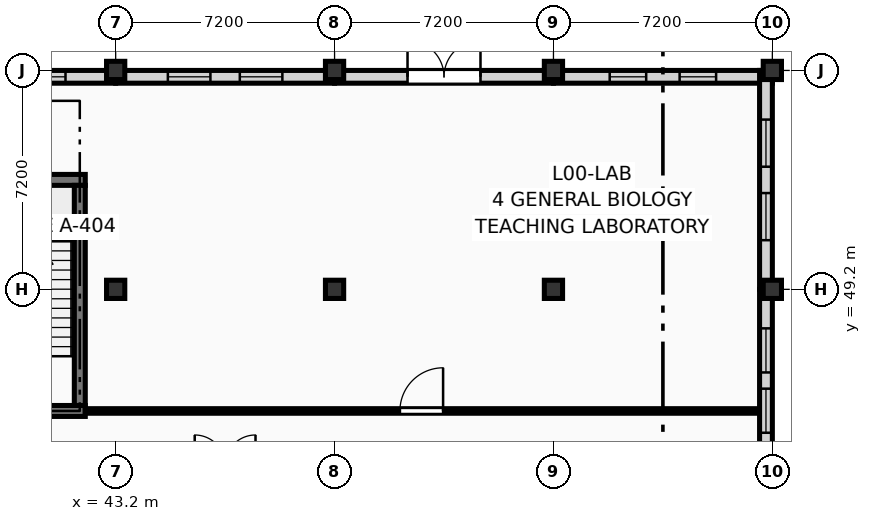
"""IFC4 building model, lengths in metres.
Left out: names, types, materials, properties, quantities, classifications, styles, units other than length and angle.
Written with IfcOpenShell. Run it as: python <this file> out.ifc"""

import sys

from ifc_helpers import new_model, si_unit, direction, frame, frame_2d, origin, origin_2d, place, context, subcontext, project, spatial, rectangle, extrude, element, fill, save


model = new_model("IFC4")
c1 = context("Model", 3, precision=1e-05, world=origin(), true_north=direction((0.0, 1.0)))
c2 = subcontext(c1, "Body", "Model", "MODEL_VIEW")
j1 = project(units=[si_unit("LENGTHUNIT", "METRE"), si_unit("PLANEANGLEUNIT", "RADIAN")], contexts=[c1])
p1 = place(None, origin())
s1 = spatial("IfcSite", under=j1, at=p1, CompositionType="ELEMENT")
p2 = place(p1, origin())
s2 = spatial("IfcBuilding", under=s1, at=p2, CompositionType="ELEMENT")
p3 = place(p2, origin())
s3 = spatial("IfcBuildingStorey", under=s2, at=p3, CompositionType="ELEMENT", Elevation=0.0)
for number, where, z_axis, x_axis in (
    (1, (43.2, 49.2, 0.0), (0.0, 0.0, 1.0), (1.0, 0.0, 0.0)),
    (2, (43.2, 56.4, 0.0), (0.0, 0.0, 1.0), (1.0, 0.0, 0.0)),
    (3, (50.4, 49.2, 0.0), (0.0, 0.0, 1.0), (1.0, 0.0, 0.0)),
    (4, (50.4, 56.4, 0.0), (0.0, 0.0, 1.0), (1.0, 0.0, 0.0)),
    (5, (57.6, 49.2, 0.0), (0.0, 0.0, 1.0), (1.0, 0.0, 0.0)),
    (6, (57.6, 56.4, 0.0), (0.0, 0.0, 1.0), (1.0, 0.0, 0.0)),
    (7, (64.8, 49.2, 0.0), (0.0, 0.0, 1.0), (1.0, 0.0, 0.0)),
    (8, (64.8, 56.4, 0.0), (0.0, 0.0, 1.0), (1.0, 0.0, 0.0)),
):
    element("IfcColumn", number, at=place(p3, frame(where, z_axis=z_axis, x_axis=x_axis)), inside=s3, PredefinedType="COLUMN", context=c2, shape_type="SweptSolid", body=[
        extrude(rectangle(XDim=0.6, YDim=0.6, at=origin_2d()), origin(), (0.0, 0.0, 1.0), 4.5),
    ])
p4 = place(p3, frame((36.0, 56.19, 0.0), z_axis=(0.0, 0.0, 1.0), x_axis=(1.0, 0.0, 0.0)))
e9 = element("IfcWall", 9, at=p4, inside=s3, PredefinedType="SOLIDWALL", context=c2, shape_type="SweptSolid", body=[
    extrude(rectangle(XDim=7.2, YDim=0.42, at=frame_2d((3.6, 0.0))), origin(), (0.0, 0.0, 1.0), 3.62),
])
p5 = place(p4, frame((1.65, 0.0, 0.45)))
e10 = element("IfcOpeningElement", 10, at=p5, cuts=e9, PredefinedType="OPENING", context=c2, shape_type="SweptSolid", body=[
    extrude(rectangle(XDim=1.5, YDim=2.4, at=frame_2d((0.75, 1.2))), frame((0.0, 0.222, 0.0), z_axis=(0.0, -1.0, 0.0), x_axis=(1.0, 0.0, 0.0)), (0.0, 0.0, 1.0), 0.444),
])
p6 = place(p4, frame((4.05, 0.0, 0.45)))
e11 = element("IfcOpeningElement", 11, at=p6, cuts=e9, PredefinedType="OPENING", context=c2, shape_type="SweptSolid", body=[
    extrude(rectangle(XDim=1.5, YDim=2.4, at=frame_2d((0.75, 1.2))), frame((0.0, 0.222, 0.0), z_axis=(0.0, -1.0, 0.0), x_axis=(1.0, 0.0, 0.0)), (0.0, 0.0, 1.0), 0.444),
])
p7 = place(p3, frame((43.2, 56.19, 0.0), z_axis=(0.0, 0.0, 1.0), x_axis=(1.0, 0.0, 0.0)))
e12 = element("IfcWall", 12, at=p7, inside=s3, PredefinedType="SOLIDWALL", context=c2, shape_type="SweptSolid", body=[
    extrude(rectangle(XDim=7.2, YDim=0.42, at=frame_2d((3.6, 0.0))), origin(), (0.0, 0.0, 1.0), 3.62),
])
p8 = place(p7, frame((1.717, 0.0, 0.45)))
e13 = element("IfcOpeningElement", 13, at=p8, cuts=e12, PredefinedType="OPENING", context=c2, shape_type="SweptSolid", body=[
    extrude(rectangle(XDim=1.4, YDim=2.38, at=frame_2d((0.7, 1.19))), frame((0.0, 0.222, 0.0), z_axis=(0.0, -1.0, 0.0), x_axis=(1.0, 0.0, 0.0)), (0.0, 0.0, 1.0), 0.444),
])
p9 = place(p7, frame((4.083, 0.0, 0.45)))
e14 = element("IfcOpeningElement", 14, at=p9, cuts=e12, PredefinedType="OPENING", context=c2, shape_type="SweptSolid", body=[
    extrude(rectangle(XDim=1.4, YDim=2.38, at=frame_2d((0.7, 1.19))), frame((0.0, 0.222, 0.0), z_axis=(0.0, -1.0, 0.0), x_axis=(1.0, 0.0, 0.0)), (0.0, 0.0, 1.0), 0.444),
])
p10 = place(p3, frame((50.4, 56.19, 0.0), z_axis=(0.0, 0.0, 1.0), x_axis=(1.0, 0.0, 0.0)))
e15 = element("IfcWall", 15, at=p10, inside=s3, PredefinedType="SOLIDWALL", context=c2, shape_type="SweptSolid", body=[
    extrude(rectangle(XDim=7.2, YDim=0.42, at=frame_2d((3.6, 0.0))), origin(), (0.0, 0.0, 1.0), 3.62),
])
p11 = place(p10, frame((2.4, 0.0, 0.0)))
e16 = element("IfcOpeningElement", 16, at=p11, cuts=e15, PredefinedType="OPENING", context=c2, shape_type="SweptSolid", body=[
    extrude(rectangle(XDim=2.4, YDim=2.6, at=frame_2d((1.2, 1.3))), frame((0.0, 0.222, 0.0), z_axis=(0.0, -1.0, 0.0), x_axis=(1.0, 0.0, 0.0)), (0.0, 0.0, 1.0), 0.444),
])
p12 = place(p3, frame((57.6, 56.19, 0.0), z_axis=(0.0, 0.0, 1.0), x_axis=(1.0, 0.0, 0.0)))
e17 = element("IfcWall", 17, at=p12, inside=s3, PredefinedType="SOLIDWALL", context=c2, shape_type="SweptSolid", body=[
    extrude(rectangle(XDim=7.2, YDim=0.42, at=frame_2d((3.6, 0.0))), origin(), (0.0, 0.0, 1.0), 3.62),
])
p13 = place(p12, frame((1.85, 0.0, 0.45)))
e18 = element("IfcOpeningElement", 18, at=p13, cuts=e17, PredefinedType="OPENING", context=c2, shape_type="SweptSolid", body=[
    extrude(rectangle(XDim=1.2, YDim=2.35, at=frame_2d((0.6, 1.175))), frame((0.0, 0.222, 0.0), z_axis=(0.0, -1.0, 0.0), x_axis=(1.0, 0.0, 0.0)), (0.0, 0.0, 1.0), 0.444),
])
p14 = place(p12, frame((4.15, 0.0, 0.45)))
e19 = element("IfcOpeningElement", 19, at=p14, cuts=e17, PredefinedType="OPENING", context=c2, shape_type="SweptSolid", body=[
    extrude(rectangle(XDim=1.2, YDim=2.35, at=frame_2d((0.6, 1.175))), frame((0.0, 0.222, 0.0), z_axis=(0.0, -1.0, 0.0), x_axis=(1.0, 0.0, 0.0)), (0.0, 0.0, 1.0), 0.444),
])
p15 = place(p3, frame((64.59, 49.2, 0.0), z_axis=(0.0, 0.0, 1.0), x_axis=(0.0, 1.0, 0.0)))
e20 = element("IfcWall", 20, at=p15, inside=s3, PredefinedType="SOLIDWALL", context=c2, shape_type="SweptSolid", body=[
    extrude(rectangle(XDim=7.2, YDim=0.42, at=frame_2d((3.6, 0.0))), origin(), (0.0, 0.0, 1.0), 3.62),
])
p16 = place(p15, frame((1.617, 0.0, 0.45)))
e21 = element("IfcOpeningElement", 21, at=p16, cuts=e20, PredefinedType="OPENING", context=c2, shape_type="SweptSolid", body=[
    extrude(rectangle(XDim=1.55, YDim=2.85, at=frame_2d((0.775, 1.425))), frame((0.0, 0.222, 0.0), z_axis=(0.0, -1.0, 0.0), x_axis=(1.0, 0.0, 0.0)), (0.0, 0.0, 1.0), 0.444),
])
p17 = place(p15, frame((4.033, 0.0, 0.45)))
e22 = element("IfcOpeningElement", 22, at=p17, cuts=e20, PredefinedType="OPENING", context=c2, shape_type="SweptSolid", body=[
    extrude(rectangle(XDim=1.55, YDim=2.85, at=frame_2d((0.775, 1.425))), frame((0.0, 0.222, 0.0), z_axis=(0.0, -1.0, 0.0), x_axis=(1.0, 0.0, 0.0)), (0.0, 0.0, 1.0), 0.444),
])
p18 = place(p3, frame((64.59, 43.2, 0.0), z_axis=(0.0, 0.0, 1.0), x_axis=(0.0, 1.0, 0.0)))
e23 = element("IfcWall", 23, at=p18, inside=s3, PredefinedType="SOLIDWALL", context=c2, shape_type="SweptSolid", body=[
    extrude(rectangle(XDim=6.0, YDim=0.42, at=frame_2d((3.0, 0.0))), origin(), (0.0, 0.0, 1.0), 3.62),
])
p19 = place(p18, frame((1.283, 0.0, 0.45)))
e24 = element("IfcOpeningElement", 24, at=p19, cuts=e23, PredefinedType="OPENING", context=c2, shape_type="SweptSolid", body=[
    extrude(rectangle(XDim=1.45, YDim=2.8, at=frame_2d((0.725, 1.4))), frame((0.0, 0.222, 0.0), z_axis=(0.0, -1.0, 0.0), x_axis=(1.0, 0.0, 0.0)), (0.0, 0.0, 1.0), 0.444),
])
p20 = place(p18, frame((3.267, 0.0, 0.45)))
e25 = element("IfcOpeningElement", 25, at=p20, cuts=e23, PredefinedType="OPENING", context=c2, shape_type="SweptSolid", body=[
    extrude(rectangle(XDim=1.45, YDim=2.8, at=frame_2d((0.725, 1.4))), frame((0.0, 0.222, 0.0), z_axis=(0.0, -1.0, 0.0), x_axis=(1.0, 0.0, 0.0)), (0.0, 0.0, 1.0), 0.444),
])
for number, where, z_axis, x_axis in (
    (26, (37.72, 45.2, 0.0), (0.0, 0.0, 1.0), (1.0, 0.0, 0.0)),
    (27, (37.72, 52.8, 0.0), (0.0, 0.0, 1.0), (1.0, 0.0, 0.0)),
):
    element("IfcWall", number, at=place(p3, frame(where, z_axis=z_axis, x_axis=x_axis)), inside=s3, PredefinedType="SHEAR", context=c2, shape_type="SweptSolid", body=[
        extrude(rectangle(XDim=4.48, YDim=0.36, at=frame_2d((2.24, 0.0))), origin(), (0.0, 0.0, 1.0), 4.25),
    ])
p21 = place(p3, frame((42.02, 45.38, 0.0), z_axis=(0.0, 0.0, 1.0), x_axis=(0.0, 1.0, 0.0)))
e28 = element("IfcWall", 28, at=p21, inside=s3, PredefinedType="SHEAR", context=c2, shape_type="SweptSolid", body=[
    extrude(rectangle(XDim=7.24, YDim=0.36, at=frame_2d((3.62, 0.0))), origin(), (0.0, 0.0, 1.0), 4.25),
])
p22 = place(p3, frame((42.2, 45.2, 0.0), z_axis=(0.0, 0.0, 1.0), x_axis=(1.0, 0.0, 0.0)))
e29 = element("IfcWall", 29, at=p22, inside=s3, PredefinedType="PARTITIONING", context=c2, shape_type="SweptSolid", body=[
    extrude(rectangle(XDim=22.12, YDim=0.15, at=frame_2d((11.06, 0.0))), origin(), (0.0, 0.0, 1.0), 4.235),
])
p23 = place(p22, frame((10.35, 0.0, 0.0)))
e30 = element("IfcOpeningElement", 30, at=p23, cuts=e29, PredefinedType="OPENING", context=c2, shape_type="SweptSolid", body=[
    extrude(rectangle(XDim=1.42, YDim=2.22, at=frame_2d((0.71, 1.11))), frame((0.0, 0.087, 0.0), z_axis=(0.0, -1.0, 0.0), x_axis=(1.0, 0.0, 0.0)), (0.0, 0.0, 1.0), 0.174),
])
p24 = place(p6, origin())
e31 = element("IfcWindow", 31, at=p24, inside=s3, PartitioningType="SINGLE_PANEL", PredefinedType="WINDOW", context=c2, shape_type="SweptSolid", body=[
    extrude(rectangle(XDim=1.5, YDim=2.4, at=frame_2d((0.75, 1.2))), frame((0.0, 0.03, 0.0), z_axis=(0.0, -1.0, 0.0), x_axis=(1.0, 0.0, 0.0)), (0.0, 0.0, 1.0), 0.06),
])
fill(e11, e31)
p25 = place(p8, origin())
e32 = element("IfcWindow", 32, at=p25, inside=s3, PartitioningType="SINGLE_PANEL", PredefinedType="WINDOW", context=c2, shape_type="SweptSolid", body=[
    extrude(rectangle(XDim=1.4, YDim=2.38, at=frame_2d((0.7, 1.19))), frame((0.0, 0.03, 0.0), z_axis=(0.0, -1.0, 0.0), x_axis=(1.0, 0.0, 0.0)), (0.0, 0.0, 1.0), 0.06),
])
fill(e13, e32)
p26 = place(p9, origin())
e33 = element("IfcWindow", 33, at=p26, inside=s3, PartitioningType="SINGLE_PANEL", PredefinedType="WINDOW", context=c2, shape_type="SweptSolid", body=[
    extrude(rectangle(XDim=1.4, YDim=2.38, at=frame_2d((0.7, 1.19))), frame((0.0, 0.03, 0.0), z_axis=(0.0, -1.0, 0.0), x_axis=(1.0, 0.0, 0.0)), (0.0, 0.0, 1.0), 0.06),
])
fill(e14, e33)
p27 = place(p11, origin())
e34 = element("IfcDoor", 34, at=p27, inside=s3, OperationType="DOUBLE_DOOR_SINGLE_SWING", PredefinedType="GATE", context=c2, shape_type="SweptSolid", body=[
    extrude(rectangle(XDim=2.4, YDim=2.6, at=frame_2d((1.2, 1.3))), frame((0.0, 0.025, 0.0), z_axis=(0.0, -1.0, 0.0), x_axis=(1.0, 0.0, 0.0)), (0.0, 0.0, 1.0), 0.05),
])
fill(e16, e34)
p28 = place(p13, origin())
e35 = element("IfcWindow", 35, at=p28, inside=s3, PartitioningType="SINGLE_PANEL", PredefinedType="WINDOW", context=c2, shape_type="SweptSolid", body=[
    extrude(rectangle(XDim=1.2, YDim=2.35, at=frame_2d((0.6, 1.175))), frame((0.0, 0.03, 0.0), z_axis=(0.0, -1.0, 0.0), x_axis=(1.0, 0.0, 0.0)), (0.0, 0.0, 1.0), 0.06),
])
fill(e18, e35)
p29 = place(p14, origin())
e36 = element("IfcWindow", 36, at=p29, inside=s3, PartitioningType="SINGLE_PANEL", PredefinedType="WINDOW", context=c2, shape_type="SweptSolid", body=[
    extrude(rectangle(XDim=1.2, YDim=2.35, at=frame_2d((0.6, 1.175))), frame((0.0, 0.03, 0.0), z_axis=(0.0, -1.0, 0.0), x_axis=(1.0, 0.0, 0.0)), (0.0, 0.0, 1.0), 0.06),
])
fill(e19, e36)
p30 = place(p16, origin())
e37 = element("IfcWindow", 37, at=p30, inside=s3, PartitioningType="SINGLE_PANEL", PredefinedType="WINDOW", context=c2, shape_type="SweptSolid", body=[
    extrude(rectangle(XDim=1.55, YDim=2.85, at=frame_2d((0.775, 1.425))), frame((0.0, 0.03, 0.0), z_axis=(0.0, -1.0, 0.0), x_axis=(1.0, 0.0, 0.0)), (0.0, 0.0, 1.0), 0.06),
])
fill(e21, e37)
p31 = place(p17, origin())
e38 = element("IfcWindow", 38, at=p31, inside=s3, PartitioningType="SINGLE_PANEL", PredefinedType="WINDOW", context=c2, shape_type="SweptSolid", body=[
    extrude(rectangle(XDim=1.55, YDim=2.85, at=frame_2d((0.775, 1.425))), frame((0.0, 0.03, 0.0), z_axis=(0.0, -1.0, 0.0), x_axis=(1.0, 0.0, 0.0)), (0.0, 0.0, 1.0), 0.06),
])
fill(e22, e38)
p32 = place(p19, origin())
e39 = element("IfcWindow", 39, at=p32, inside=s3, PartitioningType="SINGLE_PANEL", PredefinedType="WINDOW", context=c2, shape_type="SweptSolid", body=[
    extrude(rectangle(XDim=1.45, YDim=2.8, at=frame_2d((0.725, 1.4))), frame((0.0, 0.03, 0.0), z_axis=(0.0, -1.0, 0.0), x_axis=(1.0, 0.0, 0.0)), (0.0, 0.0, 1.0), 0.06),
])
fill(e24, e39)
p33 = place(p20, origin())
e40 = element("IfcWindow", 40, at=p33, inside=s3, PartitioningType="SINGLE_PANEL", PredefinedType="WINDOW", context=c2, shape_type="SweptSolid", body=[
    extrude(rectangle(XDim=1.45, YDim=2.8, at=frame_2d((0.725, 1.4))), frame((0.0, 0.03, 0.0), z_axis=(0.0, -1.0, 0.0), x_axis=(1.0, 0.0, 0.0)), (0.0, 0.0, 1.0), 0.06),
])
fill(e25, e40)
p34 = place(p23, origin())
e41 = element("IfcDoor", 41, at=p34, inside=s3, OperationType="SINGLE_SWING_RIGHT", PredefinedType="DOOR", context=c2, shape_type="SweptSolid", body=[
    extrude(rectangle(XDim=1.42, YDim=2.22, at=frame_2d((0.71, 1.11))), frame((0.0, 0.025, 0.0), z_axis=(0.0, -1.0, 0.0), x_axis=(1.0, 0.0, 0.0)), (0.0, 0.0, 1.0), 0.05),
])
fill(e30, e41)
save(model, sys.argv[1])
